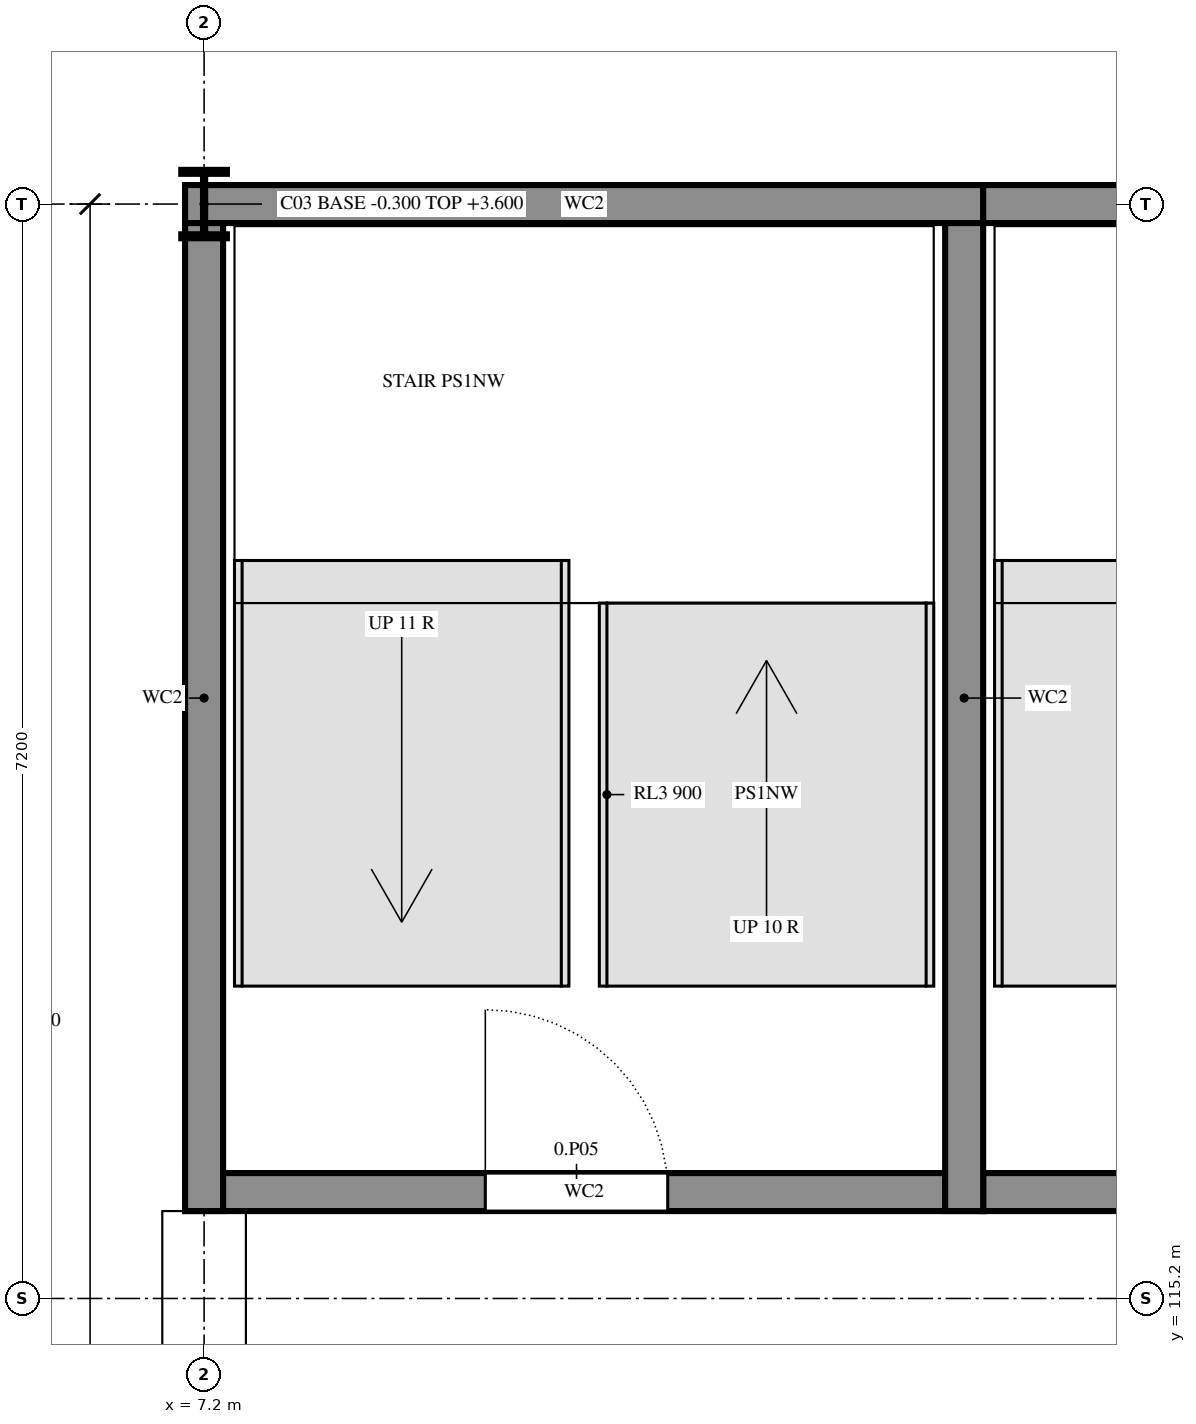
"""IFC4 building model, lengths in metres.
Left out: names, types, materials, properties, quantities, classifications, styles, units other than length and angle.
Written with IfcOpenShell. Run it as: python <this file> out.ifc"""

import sys

from ifc_helpers import new_model, si_unit, direction, frame, frame_2d, origin, origin_2d, place, context, subcontext, project, spatial, rectangle, i_section, extrude, element, fill, save


model = new_model("IFC4")
c1 = context("Model", 3, precision=1e-05, world=origin(), true_north=direction((0.0, 1.0)))
c2 = subcontext(c1, "Body", "Model", "MODEL_VIEW")
j1 = project(units=[si_unit("LENGTHUNIT", "METRE"), si_unit("PLANEANGLEUNIT", "RADIAN")], contexts=[c1])
p1 = place(None, origin())
s1 = spatial("IfcSite", under=j1, at=p1, CompositionType="ELEMENT")
p2 = place(p1, origin())
s2 = spatial("IfcBuilding", under=s1, at=p2, CompositionType="ELEMENT")
p3 = place(p2, origin())
s3 = spatial("IfcBuildingStorey", under=s2, at=p3, CompositionType="ELEMENT", Elevation=0.0)
p4 = place(p3, frame((7.2, 122.4, -0.3), z_axis=(0.0, 0.0, 1.0), x_axis=(1.0, 0.0, 0.0)))
e1 = element("IfcColumn", 1, at=p4, inside=s3, PredefinedType="COLUMN", context=c2, shape_type="SweptSolid", body=[
    extrude(i_section(OverallWidth=0.3, OverallDepth=0.45, WebThickness=0.014, FlangeThickness=0.026, FilletRadius=0.027, at=origin_2d()), origin(), (0.0, 0.0, 1.0), 3.9),
])
p5 = place(p3, frame((7.075, 115.9, 0.0), z_axis=(0.0, 0.0, 1.0), x_axis=(1.0, 0.0, 0.0)))
e2 = element("IfcWall", 2, at=p5, inside=s3, PredefinedType="SHEAR", context=c2, shape_type="SweptSolid", body=[
    extrude(rectangle(XDim=5.25, YDim=0.25, at=frame_2d((2.625, 0.0))), origin(), (0.0, 0.0, 1.0), 3.6),
])
p6 = place(p5, frame((1.975, 0.0, 0.0)))
e3 = element("IfcOpeningElement", 3, at=p6, cuts=e2, PredefinedType="OPENING", context=c2, shape_type="SweptSolid", body=[
    extrude(rectangle(XDim=1.2, YDim=2.4, at=frame_2d((0.6, 1.2))), frame((0.0, 0.135, 0.0), z_axis=(0.0, -1.0, 0.0), x_axis=(1.0, 0.0, 0.0)), (0.0, 0.0, 1.0), 0.27),
])
p7 = place(p3, frame((12.325, 115.9, 0.0), z_axis=(0.0, 0.0, 1.0), x_axis=(1.0, 0.0, 0.0)))
e4 = element("IfcWall", 4, at=p7, inside=s3, PredefinedType="SHEAR", context=c2, shape_type="SweptSolid", body=[
    extrude(rectangle(XDim=5.0, YDim=0.25, at=frame_2d((2.5, 0.0))), origin(), (0.0, 0.0, 1.0), 3.6),
])
p8 = place(p7, frame((1.75, 0.0, 0.0)))
e5 = element("IfcOpeningElement", 5, at=p8, cuts=e4, PredefinedType="OPENING", context=c2, shape_type="SweptSolid", body=[
    extrude(rectangle(XDim=1.2, YDim=2.4, at=frame_2d((0.6, 1.2))), frame((0.0, 0.135, 0.0), z_axis=(0.0, -1.0, 0.0), x_axis=(1.0, 0.0, 0.0)), (0.0, 0.0, 1.0), 0.27),
])
for number, where, z_axis, x_axis in (
    (6, (12.2, 115.775, 0.0), (0.0, 0.0, 1.0), (0.0, 1.0, 0.0)),
    (7, (7.2, 122.525, 0.0), (0.0, 0.0, 1.0), (0.0, -1.0, 0.0)),
):
    element("IfcWall", number, at=place(p3, frame(where, z_axis=z_axis, x_axis=x_axis)), inside=s3, PredefinedType="SHEAR", context=c2, shape_type="SweptSolid", body=[
        extrude(rectangle(XDim=6.75, YDim=0.25, at=frame_2d((3.375, 0.0))), origin(), (0.0, 0.0, 1.0), 3.6),
    ])
p9 = place(p3, frame((12.325, 122.4, 0.0), z_axis=(0.0, 0.0, 1.0), x_axis=(-1.0, 0.0, 0.0)))
e8 = element("IfcWall", 8, at=p9, inside=s3, PredefinedType="SHEAR", context=c2, shape_type="SweptSolid", body=[
    extrude(rectangle(XDim=5.25, YDim=0.25, at=frame_2d((2.625, 0.0))), origin(), (0.0, 0.0, 1.0), 3.6),
])
p10 = place(p3, frame((17.325, 122.4, 0.0), z_axis=(0.0, 0.0, 1.0), x_axis=(-1.0, 0.0, 0.0)))
e9 = element("IfcWall", 9, at=p10, inside=s3, PredefinedType="SHEAR", context=c2, shape_type="SweptSolid", body=[
    extrude(rectangle(XDim=5.0, YDim=0.25, at=frame_2d((2.5, 0.0))), origin(), (0.0, 0.0, 1.0), 3.6),
])
p11 = place(p3, frame((7.2, 60.525, 0.0), z_axis=(0.0, 0.0, 1.0), x_axis=(0.0, 1.0, 0.0)))
e10 = element("IfcWall", 10, at=p11, inside=s3, PredefinedType="SOLIDWALL", context=c2, shape_type="SweptSolid", body=[
    extrude(rectangle(XDim=55.25, YDim=0.55, at=frame_2d((27.625, 0.0))), origin(), (0.0, 0.0, 1.0), 3.6),
])
p12 = place(p6, origin())
e11 = element("IfcDoor", 11, at=p12, inside=s3, OperationType="SINGLE_SWING_RIGHT", PredefinedType="DOOR", context=c2, shape_type="SweptSolid", body=[
    extrude(rectangle(XDim=1.2, YDim=2.4, at=frame_2d((0.6, 1.2))), frame((0.0, 0.025, 0.0), z_axis=(0.0, -1.0, 0.0), x_axis=(1.0, 0.0, 0.0)), (0.0, 0.0, 1.0), 0.05),
])
fill(e3, e11)
save(model, sys.argv[1])
